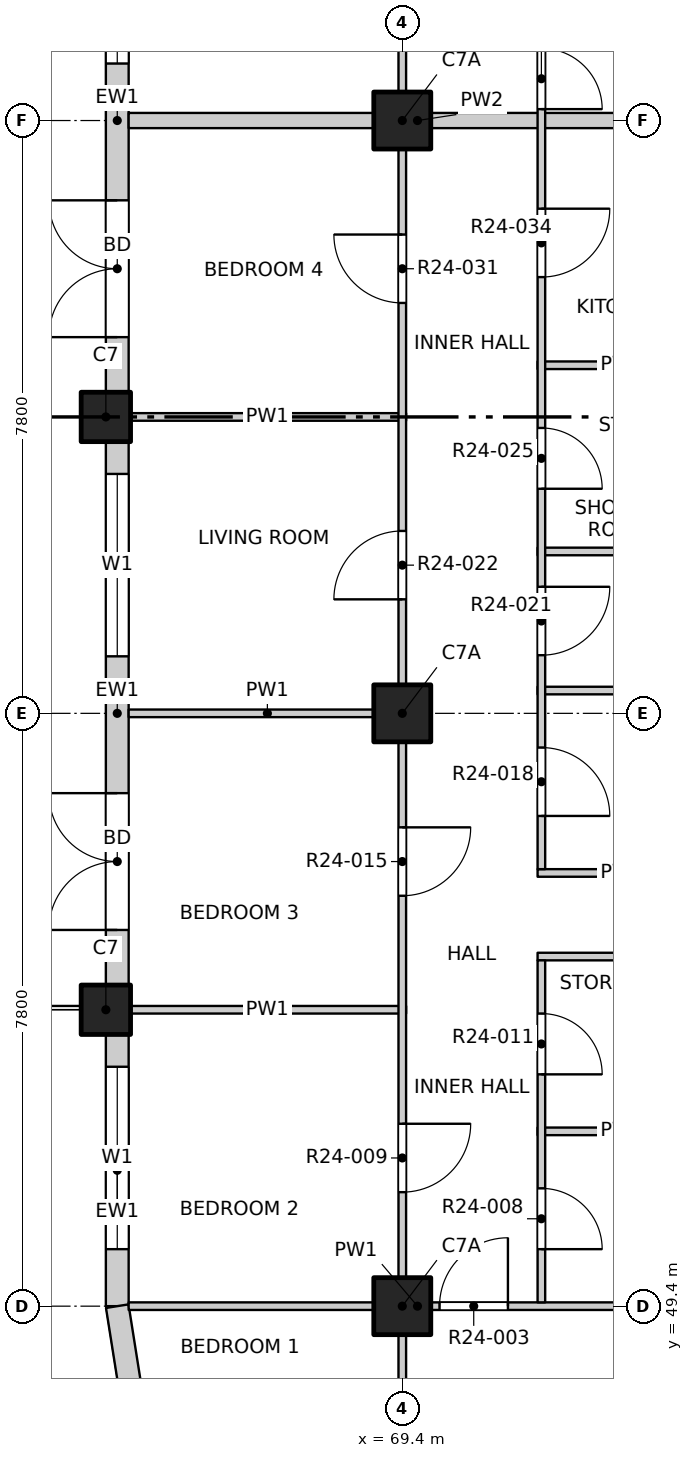
"""IFC4 building model, lengths in metres.
Left out: names, types, materials, properties, quantities, classifications, styles, units other than length and angle.
Written with IfcOpenShell. Run it as: python <this file> out.ifc"""

import sys

from ifc_helpers import new_model, si_unit, direction, frame, frame_2d, origin, origin_2d, place, context, subcontext, project, spatial, rectangle, extrude, element, fill, save


model = new_model("IFC4")
c1 = context("Model", 3, precision=1e-05, world=origin(), true_north=direction((0.0, 1.0)))
c2 = subcontext(c1, "Body", "Model", "MODEL_VIEW")
j1 = project(units=[si_unit("LENGTHUNIT", "METRE"), si_unit("PLANEANGLEUNIT", "RADIAN")], contexts=[c1])
p1 = place(None, origin())
s1 = spatial("IfcSite", under=j1, at=p1, CompositionType="ELEMENT")
p2 = place(p1, origin())
s2 = spatial("IfcBuilding", under=s1, at=p2, CompositionType="ELEMENT")
p3 = place(p2, frame((0.0, 0.0, 249.4)))
s3 = spatial("IfcBuildingStorey", under=s2, at=p3, CompositionType="ELEMENT", Elevation=249.4)
for number, where, z_axis, x_axis in (
    (1, (65.5, 53.3, -0.25), (0.0, 0.0, 1.0), (1.0, 0.0, 0.0)),
    (2, (65.5, 61.1, -0.25), (0.0, 0.0, 1.0), (1.0, 0.0, 0.0)),
):
    element("IfcColumn", number, at=place(p3, frame(where, z_axis=z_axis, x_axis=x_axis)), inside=s3, PredefinedType="COLUMN", context=c2, shape_type="SweptSolid", body=[
        extrude(rectangle(XDim=0.65, YDim=0.65, at=origin_2d()), origin(), (0.0, 0.0, 1.0), 3.4),
    ])
for number, where, z_axis, x_axis in (
    (3, (69.4, 49.4, -0.25), (0.0, 0.0, 1.0), (1.0, 0.0, 0.0)),
    (4, (69.4, 57.2, -0.25), (0.0, 0.0, 1.0), (1.0, 0.0, 0.0)),
    (5, (69.4, 65.0, -0.25), (0.0, 0.0, 1.0), (1.0, 0.0, 0.0)),
):
    element("IfcColumn", number, at=place(p3, frame(where, z_axis=z_axis, x_axis=x_axis)), inside=s3, PredefinedType="COLUMN", context=c2, shape_type="SweptSolid", body=[
        extrude(rectangle(XDim=0.75, YDim=0.75, at=origin_2d()), origin(), (0.0, 0.0, 1.0), 3.4),
    ])
p4 = place(p3, frame((65.65, 49.4, 0.0), z_axis=(0.0, 0.0, 1.0), x_axis=(0.0, 1.0, 0.0)))
e6 = element("IfcWall", 6, at=p4, inside=s3, PredefinedType="SOLIDWALL", context=c2, shape_type="SweptSolid", body=[
    extrude(rectangle(XDim=3.575, YDim=0.3, at=frame_2d((1.788, 0.0))), origin(), (0.0, 0.0, 1.0), 2.7),
])
p5 = place(p4, frame((0.75, 0.0, 0.9)))
e7 = element("IfcOpeningElement", 7, at=p5, cuts=e6, PredefinedType="OPENING", context=c2, shape_type="SweptSolid", body=[
    extrude(rectangle(XDim=2.4, YDim=1.8, at=frame_2d((1.2, 0.9))), frame((0.0, 0.16, 0.0), z_axis=(0.0, -1.0, 0.0), x_axis=(1.0, 0.0, 0.0)), (0.0, 0.0, 1.0), 0.32),
])
p6 = place(p3, frame((65.65, 53.625, 0.0), z_axis=(0.0, 0.0, 1.0), x_axis=(0.0, 1.0, 0.0)))
e8 = element("IfcWall", 8, at=p6, inside=s3, PredefinedType="SOLIDWALL", context=c2, shape_type="SweptSolid", body=[
    extrude(rectangle(XDim=7.15, YDim=0.3, at=frame_2d((3.575, 0.0))), origin(), (0.0, 0.0, 1.0), 2.7),
])
p7 = place(p6, frame((0.725, 0.0, 0.0)))
e9 = element("IfcOpeningElement", 9, at=p7, cuts=e8, PredefinedType="OPENING", context=c2, shape_type="SweptSolid", body=[
    extrude(rectangle(XDim=1.8, YDim=2.4, at=frame_2d((0.9, 1.2))), frame((0.0, 0.16, 0.0), z_axis=(0.0, -1.0, 0.0), x_axis=(1.0, 0.0, 0.0)), (0.0, 0.0, 1.0), 0.32),
])
p8 = place(p6, frame((4.325, 0.0, 0.9)))
e10 = element("IfcOpeningElement", 10, at=p8, cuts=e8, PredefinedType="OPENING", context=c2, shape_type="SweptSolid", body=[
    extrude(rectangle(XDim=2.4, YDim=1.8, at=frame_2d((1.2, 0.9))), frame((0.0, 0.16, 0.0), z_axis=(0.0, -1.0, 0.0), x_axis=(1.0, 0.0, 0.0)), (0.0, 0.0, 1.0), 0.32),
])
p9 = place(p3, frame((65.65, 61.425, 0.0), z_axis=(0.0, 0.0, 1.0), x_axis=(0.0, 1.0, 0.0)))
e11 = element("IfcWall", 11, at=p9, inside=s3, PredefinedType="SOLIDWALL", context=c2, shape_type="SweptSolid", body=[
    extrude(rectangle(XDim=7.15, YDim=0.3, at=frame_2d((3.575, 0.0))), origin(), (0.0, 0.0, 1.0), 2.7),
])
p10 = place(p9, frame((0.725, 0.0, 0.0)))
e12 = element("IfcOpeningElement", 12, at=p10, cuts=e11, PredefinedType="OPENING", context=c2, shape_type="SweptSolid", body=[
    extrude(rectangle(XDim=1.8, YDim=2.4, at=frame_2d((0.9, 1.2))), frame((0.0, 0.16, 0.0), z_axis=(0.0, -1.0, 0.0), x_axis=(1.0, 0.0, 0.0)), (0.0, 0.0, 1.0), 0.32),
])
p11 = place(p9, frame((4.325, 0.0, 0.9)))
e13 = element("IfcOpeningElement", 13, at=p11, cuts=e11, PredefinedType="OPENING", context=c2, shape_type="SweptSolid", body=[
    extrude(rectangle(XDim=2.4, YDim=1.8, at=frame_2d((1.2, 0.9))), frame((0.0, 0.16, 0.0), z_axis=(0.0, -1.0, 0.0), x_axis=(1.0, 0.0, 0.0)), (0.0, 0.0, 1.0), 0.32),
])
p12 = place(p3, frame((65.65, 49.4, 0.0), z_axis=(0.0, 0.0, 1.0), x_axis=(0.156496880861, -0.987678452879, 0.0)))
e14 = element("IfcWall", 14, at=p12, inside=s3, PredefinedType="SOLIDWALL", context=c2, shape_type="SweptSolid", body=[
    extrude(rectangle(XDim=1.173, YDim=0.3, at=frame_2d((0.586, 0.0))), origin(), (0.0, 0.0, 1.0), 2.7),
])
p13 = place(p3, frame((65.8, 49.4, 0.0), z_axis=(0.0, 0.0, 1.0), x_axis=(1.0, 0.0, 0.0)))
e15 = element("IfcWall", 15, at=p13, inside=s3, PredefinedType="PARTITIONING", context=c2, shape_type="SweptSolid", body=[
    extrude(rectangle(XDim=7.6, YDim=0.1, at=frame_2d((3.8, 0.0))), origin(), (0.0, 0.0, 1.0), 3.15),
])
p14 = place(p13, frame((4.09, 0.0, 0.0)))
e16 = element("IfcOpeningElement", 16, at=p14, cuts=e15, PredefinedType="OPENING", context=c2, shape_type="SweptSolid", body=[
    extrude(rectangle(XDim=0.9, YDim=2.1, at=frame_2d((0.45, 1.05))), frame((0.0, 0.06, 0.0), z_axis=(0.0, -1.0, 0.0), x_axis=(1.0, 0.0, 0.0)), (0.0, 0.0, 1.0), 0.12),
])
p15 = place(p3, frame((71.18, 51.7, 0.0), z_axis=(0.0, 0.0, 1.0), x_axis=(1.0, 0.0, 0.0)))
e17 = element("IfcWall", 17, at=p15, inside=s3, PredefinedType="PARTITIONING", context=c2, shape_type="SweptSolid", body=[
    extrude(rectangle(XDim=2.22, YDim=0.1, at=frame_2d((1.11, 0.0))), origin(), (0.0, 0.0, 1.0), 3.15),
])
p16 = place(p3, frame((65.8, 53.3, 0.0), z_axis=(0.0, 0.0, 1.0), x_axis=(1.0, 0.0, 0.0)))
e18 = element("IfcWall", 18, at=p16, inside=s3, PredefinedType="PARTITIONING", context=c2, shape_type="SweptSolid", body=[
    extrude(rectangle(XDim=3.65, YDim=0.1, at=frame_2d((1.825, 0.0))), origin(), (0.0, 0.0, 1.0), 3.15),
])
for number, where, z_axis, x_axis in (
    (19, (71.18, 54.0, 0.0), (0.0, 0.0, 1.0), (1.0, 0.0, 0.0)),
    (20, (71.18, 55.1, 0.0), (0.0, 0.0, 1.0), (1.0, 0.0, 0.0)),
):
    element("IfcWall", number, at=place(p3, frame(where, z_axis=z_axis, x_axis=x_axis)), inside=s3, PredefinedType="PARTITIONING", context=c2, shape_type="SweptSolid", body=[
        extrude(rectangle(XDim=2.22, YDim=0.1, at=frame_2d((1.11, 0.0))), origin(), (0.0, 0.0, 1.0), 3.15),
    ])
p17 = place(p3, frame((65.8, 57.2, 0.0), z_axis=(0.0, 0.0, 1.0), x_axis=(1.0, 0.0, 0.0)))
e21 = element("IfcWall", 21, at=p17, inside=s3, PredefinedType="PARTITIONING", context=c2, shape_type="SweptSolid", body=[
    extrude(rectangle(XDim=3.65, YDim=0.1, at=frame_2d((1.825, 0.0))), origin(), (0.0, 0.0, 1.0), 3.15),
])
for number, where, z_axis, x_axis in (
    (22, (71.18, 57.5, 0.0), (0.0, 0.0, 1.0), (1.0, 0.0, 0.0)),
    (23, (71.18, 59.33, 0.0), (0.0, 0.0, 1.0), (1.0, 0.0, 0.0)),
):
    element("IfcWall", number, at=place(p3, frame(where, z_axis=z_axis, x_axis=x_axis)), inside=s3, PredefinedType="PARTITIONING", context=c2, shape_type="SweptSolid", body=[
        extrude(rectangle(XDim=2.22, YDim=0.1, at=frame_2d((1.11, 0.0))), origin(), (0.0, 0.0, 1.0), 3.15),
    ])
p18 = place(p3, frame((65.8, 61.1, 0.0), z_axis=(0.0, 0.0, 1.0), x_axis=(1.0, 0.0, 0.0)))
e24 = element("IfcWall", 24, at=p18, inside=s3, PredefinedType="PARTITIONING", context=c2, shape_type="SweptSolid", body=[
    extrude(rectangle(XDim=3.65, YDim=0.1, at=frame_2d((1.825, 0.0))), origin(), (0.0, 0.0, 1.0), 2.55),
])
p19 = place(p3, frame((71.18, 61.78, 0.0), z_axis=(0.0, 0.0, 1.0), x_axis=(1.0, 0.0, 0.0)))
e25 = element("IfcWall", 25, at=p19, inside=s3, PredefinedType="PARTITIONING", context=c2, shape_type="SweptSolid", body=[
    extrude(rectangle(XDim=2.22, YDim=0.1, at=frame_2d((1.11, 0.0))), origin(), (0.0, 0.0, 1.0), 3.15),
])
p20 = place(p3, frame((65.8, 65.0, 0.0), z_axis=(0.0, 0.0, 1.0), x_axis=(1.0, 0.0, 0.0)))
e26 = element("IfcWall", 26, at=p20, inside=s3, PredefinedType="PARTITIONING", context=c2, shape_type="SweptSolid", body=[
    extrude(rectangle(XDim=7.6, YDim=0.2, at=frame_2d((3.8, 0.0))), origin(), (0.0, 0.0, 1.0), 3.15),
])
p21 = place(p3, frame((69.4, 45.8, 0.0), z_axis=(0.0, 0.0, 1.0), x_axis=(0.0, 1.0, 0.0)))
e27 = element("IfcWall", 27, at=p21, inside=s3, PredefinedType="PARTITIONING", context=c2, shape_type="SweptSolid", body=[
    extrude(rectangle(XDim=38.4, YDim=0.1, at=frame_2d((19.2, 0.0))), origin(), (0.0, 0.0, 1.0), 3.15),
])
p22 = place(p21, frame((1.05, 0.0, 0.0)))
e28 = element("IfcOpeningElement", 28, at=p22, cuts=e27, PredefinedType="OPENING", context=c2, shape_type="SweptSolid", body=[
    extrude(rectangle(XDim=1.2, YDim=2.1, at=frame_2d((0.6, 1.05))), frame((0.0, 0.06, 0.0), z_axis=(0.0, -1.0, 0.0), x_axis=(1.0, 0.0, 0.0)), (0.0, 0.0, 1.0), 0.12),
])
p23 = place(p21, frame((5.1, 0.0, 0.0)))
e29 = element("IfcOpeningElement", 29, at=p23, cuts=e27, PredefinedType="OPENING", context=c2, shape_type="SweptSolid", body=[
    extrude(rectangle(XDim=0.9, YDim=2.1, at=frame_2d((0.45, 1.05))), frame((0.0, 0.06, 0.0), z_axis=(0.0, -1.0, 0.0), x_axis=(1.0, 0.0, 0.0)), (0.0, 0.0, 1.0), 0.12),
])
p24 = place(p21, frame((9.0, 0.0, 0.0)))
e30 = element("IfcOpeningElement", 30, at=p24, cuts=e27, PredefinedType="OPENING", context=c2, shape_type="SweptSolid", body=[
    extrude(rectangle(XDim=0.9, YDim=2.1, at=frame_2d((0.45, 1.05))), frame((0.0, 0.06, 0.0), z_axis=(0.0, -1.0, 0.0), x_axis=(1.0, 0.0, 0.0)), (0.0, 0.0, 1.0), 0.12),
])
p25 = place(p21, frame((12.9, 0.0, 0.0)))
e31 = element("IfcOpeningElement", 31, at=p25, cuts=e27, PredefinedType="OPENING", context=c2, shape_type="SweptSolid", body=[
    extrude(rectangle(XDim=0.9, YDim=2.1, at=frame_2d((0.45, 1.05))), frame((0.0, 0.06, 0.0), z_axis=(0.0, -1.0, 0.0), x_axis=(1.0, 0.0, 0.0)), (0.0, 0.0, 1.0), 0.12),
])
p26 = place(p21, frame((16.8, 0.0, 0.0)))
e32 = element("IfcOpeningElement", 32, at=p26, cuts=e27, PredefinedType="OPENING", context=c2, shape_type="SweptSolid", body=[
    extrude(rectangle(XDim=0.9, YDim=2.1, at=frame_2d((0.45, 1.05))), frame((0.0, 0.06, 0.0), z_axis=(0.0, -1.0, 0.0), x_axis=(1.0, 0.0, 0.0)), (0.0, 0.0, 1.0), 0.12),
])
p27 = place(p21, frame((20.7, 0.0, 0.0)))
e33 = element("IfcOpeningElement", 33, at=p27, cuts=e27, PredefinedType="OPENING", context=c2, shape_type="SweptSolid", body=[
    extrude(rectangle(XDim=0.9, YDim=2.1, at=frame_2d((0.45, 1.05))), frame((0.0, 0.06, 0.0), z_axis=(0.0, -1.0, 0.0), x_axis=(1.0, 0.0, 0.0)), (0.0, 0.0, 1.0), 0.12),
])
p28 = place(p21, frame((24.6, 0.0, 0.0)))
e34 = element("IfcOpeningElement", 34, at=p28, cuts=e27, PredefinedType="OPENING", context=c2, shape_type="SweptSolid", body=[
    extrude(rectangle(XDim=0.9, YDim=2.1, at=frame_2d((0.45, 1.05))), frame((0.0, 0.06, 0.0), z_axis=(0.0, -1.0, 0.0), x_axis=(1.0, 0.0, 0.0)), (0.0, 0.0, 1.0), 0.12),
])
p29 = place(p21, frame((30.3, 0.0, 0.0)))
e35 = element("IfcOpeningElement", 35, at=p29, cuts=e27, PredefinedType="OPENING", context=c2, shape_type="SweptSolid", body=[
    extrude(rectangle(XDim=1.2, YDim=2.1, at=frame_2d((0.6, 1.05))), frame((0.0, 0.06, 0.0), z_axis=(0.0, -1.0, 0.0), x_axis=(1.0, 0.0, 0.0)), (0.0, 0.0, 1.0), 0.12),
])
p30 = place(p21, frame((36.15, 0.0, 0.0)))
e36 = element("IfcOpeningElement", 36, at=p30, cuts=e27, PredefinedType="OPENING", context=c2, shape_type="SweptSolid", body=[
    extrude(rectangle(XDim=1.2, YDim=2.1, at=frame_2d((0.6, 1.05))), frame((0.0, 0.06, 0.0), z_axis=(0.0, -1.0, 0.0), x_axis=(1.0, 0.0, 0.0)), (0.0, 0.0, 1.0), 0.12),
])
p31 = place(p3, frame((71.23, 49.45, 0.0), z_axis=(0.0, 0.0, 1.0), x_axis=(0.0, 1.0, 0.0)))
e37 = element("IfcWall", 37, at=p31, inside=s3, PredefinedType="PARTITIONING", context=c2, shape_type="SweptSolid", body=[
    extrude(rectangle(XDim=4.5, YDim=0.1, at=frame_2d((2.25, 0.0))), origin(), (0.0, 0.0, 1.0), 3.15),
])
p32 = place(p31, frame((0.7, 0.0, 0.0)))
e38 = element("IfcOpeningElement", 38, at=p32, cuts=e37, PredefinedType="OPENING", context=c2, shape_type="SweptSolid", body=[
    extrude(rectangle(XDim=0.8, YDim=2.1, at=frame_2d((0.4, 1.05))), frame((0.0, 0.06, 0.0), z_axis=(0.0, -1.0, 0.0), x_axis=(1.0, 0.0, 0.0)), (0.0, 0.0, 1.0), 0.12),
])
p33 = place(p31, frame((3.0, 0.0, 0.0)))
e39 = element("IfcOpeningElement", 39, at=p33, cuts=e37, PredefinedType="OPENING", context=c2, shape_type="SweptSolid", body=[
    extrude(rectangle(XDim=0.8, YDim=2.1, at=frame_2d((0.4, 1.05))), frame((0.0, 0.06, 0.0), z_axis=(0.0, -1.0, 0.0), x_axis=(1.0, 0.0, 0.0)), (0.0, 0.0, 1.0), 0.12),
])
p34 = place(p3, frame((71.23, 55.15, 0.0), z_axis=(0.0, 0.0, 1.0), x_axis=(0.0, 1.0, 0.0)))
e40 = element("IfcWall", 40, at=p34, inside=s3, PredefinedType="PARTITIONING", context=c2, shape_type="SweptSolid", body=[
    extrude(rectangle(XDim=10.9, YDim=0.1, at=frame_2d((5.45, 0.0))), origin(), (0.0, 0.0, 1.0), 3.15),
])
p35 = place(p34, frame((0.7, 0.0, 0.0)))
e41 = element("IfcOpeningElement", 41, at=p35, cuts=e40, PredefinedType="OPENING", context=c2, shape_type="SweptSolid", body=[
    extrude(rectangle(XDim=0.9, YDim=2.1, at=frame_2d((0.45, 1.05))), frame((0.0, 0.06, 0.0), z_axis=(0.0, -1.0, 0.0), x_axis=(1.0, 0.0, 0.0)), (0.0, 0.0, 1.0), 0.12),
])
p36 = place(p34, frame((2.815, 0.0, 0.0)))
e42 = element("IfcOpeningElement", 42, at=p36, cuts=e40, PredefinedType="OPENING", context=c2, shape_type="SweptSolid", body=[
    extrude(rectangle(XDim=0.9, YDim=2.1, at=frame_2d((0.45, 1.05))), frame((0.0, 0.06, 0.0), z_axis=(0.0, -1.0, 0.0), x_axis=(1.0, 0.0, 0.0)), (0.0, 0.0, 1.0), 0.12),
])
p37 = place(p34, frame((5.005, 0.0, 0.0)))
e43 = element("IfcOpeningElement", 43, at=p37, cuts=e40, PredefinedType="OPENING", context=c2, shape_type="SweptSolid", body=[
    extrude(rectangle(XDim=0.8, YDim=2.1, at=frame_2d((0.4, 1.05))), frame((0.0, 0.06, 0.0), z_axis=(0.0, -1.0, 0.0), x_axis=(1.0, 0.0, 0.0)), (0.0, 0.0, 1.0), 0.12),
])
p38 = place(p34, frame((7.79, 0.0, 0.0)))
e44 = element("IfcOpeningElement", 44, at=p38, cuts=e40, PredefinedType="OPENING", context=c2, shape_type="SweptSolid", body=[
    extrude(rectangle(XDim=0.9, YDim=2.1, at=frame_2d((0.45, 1.05))), frame((0.0, 0.06, 0.0), z_axis=(0.0, -1.0, 0.0), x_axis=(1.0, 0.0, 0.0)), (0.0, 0.0, 1.0), 0.12),
])
p39 = place(p34, frame((10.0, 0.0, 0.0)))
e45 = element("IfcOpeningElement", 45, at=p39, cuts=e40, PredefinedType="OPENING", context=c2, shape_type="SweptSolid", body=[
    extrude(rectangle(XDim=0.8, YDim=2.1, at=frame_2d((0.4, 1.05))), frame((0.0, 0.06, 0.0), z_axis=(0.0, -1.0, 0.0), x_axis=(1.0, 0.0, 0.0)), (0.0, 0.0, 1.0), 0.12),
])
p40 = place(p5, origin())
e46 = element("IfcWindow", 46, at=p40, inside=s3, PartitioningType="DOUBLE_PANEL_VERTICAL", PredefinedType="WINDOW", context=c2, shape_type="SweptSolid", body=[
    extrude(rectangle(XDim=2.4, YDim=1.8, at=frame_2d((1.2, 0.9))), frame((0.0, 0.03, 0.0), z_axis=(0.0, -1.0, 0.0), x_axis=(1.0, 0.0, 0.0)), (0.0, 0.0, 1.0), 0.06),
])
fill(e7, e46)
p41 = place(p7, origin())
e47 = element("IfcDoor", 47, at=p41, inside=s3, OperationType="DOUBLE_DOOR_SINGLE_SWING", PredefinedType="DOOR", context=c2, shape_type="SweptSolid", body=[
    extrude(rectangle(XDim=1.8, YDim=2.4, at=frame_2d((0.9, 1.2))), frame((0.0, 0.025, 0.0), z_axis=(0.0, -1.0, 0.0), x_axis=(1.0, 0.0, 0.0)), (0.0, 0.0, 1.0), 0.05),
])
fill(e9, e47)
p42 = place(p8, origin())
e48 = element("IfcWindow", 48, at=p42, inside=s3, PartitioningType="DOUBLE_PANEL_VERTICAL", PredefinedType="WINDOW", context=c2, shape_type="SweptSolid", body=[
    extrude(rectangle(XDim=2.4, YDim=1.8, at=frame_2d((1.2, 0.9))), frame((0.0, 0.03, 0.0), z_axis=(0.0, -1.0, 0.0), x_axis=(1.0, 0.0, 0.0)), (0.0, 0.0, 1.0), 0.06),
])
fill(e10, e48)
p43 = place(p10, origin())
e49 = element("IfcDoor", 49, at=p43, inside=s3, OperationType="DOUBLE_DOOR_SINGLE_SWING", PredefinedType="DOOR", context=c2, shape_type="SweptSolid", body=[
    extrude(rectangle(XDim=1.8, YDim=2.4, at=frame_2d((0.9, 1.2))), frame((0.0, 0.025, 0.0), z_axis=(0.0, -1.0, 0.0), x_axis=(1.0, 0.0, 0.0)), (0.0, 0.0, 1.0), 0.05),
])
fill(e12, e49)
p44 = place(p11, origin())
e50 = element("IfcWindow", 50, at=p44, inside=s3, PartitioningType="DOUBLE_PANEL_VERTICAL", PredefinedType="WINDOW", context=c2, shape_type="SweptSolid", body=[
    extrude(rectangle(XDim=2.4, YDim=1.8, at=frame_2d((1.2, 0.9))), frame((0.0, 0.03, 0.0), z_axis=(0.0, -1.0, 0.0), x_axis=(1.0, 0.0, 0.0)), (0.0, 0.0, 1.0), 0.06),
])
fill(e13, e50)
p45 = place(p14, origin())
e51 = element("IfcDoor", 51, at=p45, inside=s3, OperationType="SINGLE_SWING_RIGHT", PredefinedType="DOOR", context=c2, shape_type="SweptSolid", body=[
    extrude(rectangle(XDim=0.9, YDim=2.1, at=frame_2d((0.45, 1.05))), frame((0.0, 0.025, 0.0), z_axis=(0.0, -1.0, 0.0), x_axis=(1.0, 0.0, 0.0)), (0.0, 0.0, 1.0), 0.05),
])
fill(e16, e51)
p46 = place(p32, origin())
e52 = element("IfcDoor", 52, at=p46, inside=s3, OperationType="SINGLE_SWING_RIGHT", PredefinedType="DOOR", context=c2, shape_type="SweptSolid", body=[
    extrude(rectangle(XDim=0.8, YDim=2.1, at=frame_2d((0.4, 1.05))), frame((0.0, 0.025, 0.0), z_axis=(0.0, -1.0, 0.0), x_axis=(1.0, 0.0, 0.0)), (0.0, 0.0, 1.0), 0.05),
])
fill(e38, e52)
p47 = place(p23, origin())
e53 = element("IfcDoor", 53, at=p47, inside=s3, OperationType="SINGLE_SWING_LEFT", PredefinedType="DOOR", context=c2, shape_type="SweptSolid", body=[
    extrude(rectangle(XDim=0.9, YDim=2.1, at=frame_2d((0.45, 1.05))), frame((0.0, 0.025, 0.0), z_axis=(0.0, -1.0, 0.0), x_axis=(1.0, 0.0, 0.0)), (0.0, 0.0, 1.0), 0.05),
])
fill(e29, e53)
p48 = place(p33, origin())
e54 = element("IfcDoor", 54, at=p48, inside=s3, OperationType="SINGLE_SWING_RIGHT", PredefinedType="DOOR", context=c2, shape_type="SweptSolid", body=[
    extrude(rectangle(XDim=0.8, YDim=2.1, at=frame_2d((0.4, 1.05))), frame((0.0, 0.025, 0.0), z_axis=(0.0, -1.0, 0.0), x_axis=(1.0, 0.0, 0.0)), (0.0, 0.0, 1.0), 0.05),
])
fill(e39, e54)
p49 = place(p24, origin())
e55 = element("IfcDoor", 55, at=p49, inside=s3, OperationType="SINGLE_SWING_LEFT", PredefinedType="DOOR", context=c2, shape_type="SweptSolid", body=[
    extrude(rectangle(XDim=0.9, YDim=2.1, at=frame_2d((0.45, 1.05))), frame((0.0, 0.025, 0.0), z_axis=(0.0, -1.0, 0.0), x_axis=(1.0, 0.0, 0.0)), (0.0, 0.0, 1.0), 0.05),
])
fill(e30, e55)
p50 = place(p35, origin())
e56 = element("IfcDoor", 56, at=p50, inside=s3, OperationType="SINGLE_SWING_RIGHT", PredefinedType="DOOR", context=c2, shape_type="SweptSolid", body=[
    extrude(rectangle(XDim=0.9, YDim=2.1, at=frame_2d((0.45, 1.05))), frame((0.0, 0.025, 0.0), z_axis=(0.0, -1.0, 0.0), x_axis=(1.0, 0.0, 0.0)), (0.0, 0.0, 1.0), 0.05),
])
fill(e41, e56)
p51 = place(p36, origin())
e57 = element("IfcDoor", 57, at=p51, inside=s3, OperationType="SINGLE_SWING_LEFT", PredefinedType="DOOR", context=c2, shape_type="SweptSolid", body=[
    extrude(rectangle(XDim=0.9, YDim=2.1, at=frame_2d((0.45, 1.05))), frame((0.0, 0.025, 0.0), z_axis=(0.0, -1.0, 0.0), x_axis=(1.0, 0.0, 0.0)), (0.0, 0.0, 1.0), 0.05),
])
fill(e42, e57)
p52 = place(p25, origin())
e58 = element("IfcDoor", 58, at=p52, inside=s3, OperationType="SINGLE_SWING_LEFT", PredefinedType="DOOR", context=c2, shape_type="SweptSolid", body=[
    extrude(rectangle(XDim=0.9, YDim=2.1, at=frame_2d((0.45, 1.05))), frame((0.0, 0.025, 0.0), z_axis=(0.0, -1.0, 0.0), x_axis=(1.0, 0.0, 0.0)), (0.0, 0.0, 1.0), 0.05),
])
fill(e31, e58)
p53 = place(p37, origin())
e59 = element("IfcDoor", 59, at=p53, inside=s3, OperationType="SINGLE_SWING_RIGHT", PredefinedType="DOOR", context=c2, shape_type="SweptSolid", body=[
    extrude(rectangle(XDim=0.8, YDim=2.1, at=frame_2d((0.4, 1.05))), frame((0.0, 0.025, 0.0), z_axis=(0.0, -1.0, 0.0), x_axis=(1.0, 0.0, 0.0)), (0.0, 0.0, 1.0), 0.05),
])
fill(e43, e59)
p54 = place(p26, origin())
e60 = element("IfcDoor", 60, at=p54, inside=s3, OperationType="SINGLE_SWING_RIGHT", PredefinedType="DOOR", context=c2, shape_type="SweptSolid", body=[
    extrude(rectangle(XDim=0.9, YDim=2.1, at=frame_2d((0.45, 1.05))), frame((0.0, 0.025, 0.0), z_axis=(0.0, -1.0, 0.0), x_axis=(1.0, 0.0, 0.0)), (0.0, 0.0, 1.0), 0.05),
])
fill(e32, e60)
p55 = place(p38, origin())
e61 = element("IfcDoor", 61, at=p55, inside=s3, OperationType="SINGLE_SWING_LEFT", PredefinedType="DOOR", context=c2, shape_type="SweptSolid", body=[
    extrude(rectangle(XDim=0.9, YDim=2.1, at=frame_2d((0.45, 1.05))), frame((0.0, 0.025, 0.0), z_axis=(0.0, -1.0, 0.0), x_axis=(1.0, 0.0, 0.0)), (0.0, 0.0, 1.0), 0.05),
])
fill(e44, e61)
p56 = place(p39, origin())
e62 = element("IfcDoor", 62, at=p56, inside=s3, OperationType="SINGLE_SWING_RIGHT", PredefinedType="DOOR", context=c2, shape_type="SweptSolid", body=[
    extrude(rectangle(XDim=0.8, YDim=2.1, at=frame_2d((0.4, 1.05))), frame((0.0, 0.025, 0.0), z_axis=(0.0, -1.0, 0.0), x_axis=(1.0, 0.0, 0.0)), (0.0, 0.0, 1.0), 0.05),
])
fill(e45, e62)
save(model, sys.argv[1])
